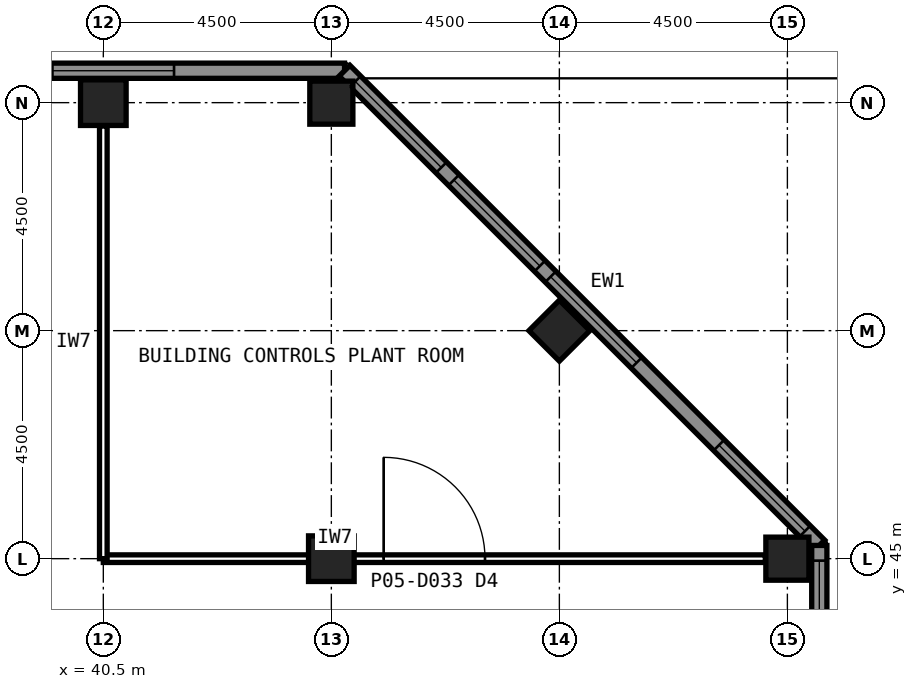
"""IFC4 building model, lengths in metres.
Left out: names, types, materials, properties, quantities, classifications, styles, units other than length and angle.
Written with IfcOpenShell. Run it as: python <this file> out.ifc"""

import sys

from ifc_helpers import new_model, si_unit, direction, frame, frame_2d, origin, origin_2d, place, context, subcontext, project, spatial, rectangle, hollow_rectangle, extrude, element, fill, save


model = new_model("IFC4")
c1 = context("Model", 3, precision=1e-05, world=origin(), true_north=direction((0.0, 1.0)))
c2 = subcontext(c1, "Body", "Model", "MODEL_VIEW")
j1 = project(units=[si_unit("LENGTHUNIT", "METRE"), si_unit("PLANEANGLEUNIT", "RADIAN")], contexts=[c1])
p1 = place(None, origin())
s1 = spatial("IfcSite", under=j1, at=p1, CompositionType="ELEMENT")
p2 = place(p1, origin())
s2 = spatial("IfcBuilding", under=s1, at=p2, CompositionType="ELEMENT")
p3 = place(p2, frame((0.0, 0.0, 23.0)))
s3 = spatial("IfcBuildingStorey", under=s2, at=p3, CompositionType="ELEMENT", Elevation=23.0)
for number, where, z_axis, x_axis in (
    (1, (54.0, 45.0, 0.0), (0.0, 0.0, 1.0), (1.0, 0.0, 0.0)),
    (2, (45.0, 54.0, 0.0), (0.0, 0.0, 1.0), (1.0, 0.0, 0.0)),
):
    element("IfcColumn", number, at=place(p3, frame(where, z_axis=z_axis, x_axis=x_axis)), inside=s3, PredefinedType="COLUMN", context=c2, shape_type="SweptSolid", body=[
        extrude(hollow_rectangle(XDim=0.85, YDim=0.85, WallThickness=0.05, at=origin_2d()), origin(), (0.0, 0.0, 1.0), 6.0),
    ])
p4 = place(p3, frame((40.5, 54.0, 0.0), z_axis=(0.0, 0.0, 1.0), x_axis=(1.0, 0.0, 0.0)))
e3 = element("IfcColumn", 3, at=p4, inside=s3, PredefinedType="COLUMN", context=c2, shape_type="SweptSolid", body=[
    extrude(hollow_rectangle(XDim=0.9, YDim=0.9, WallThickness=0.063, at=origin_2d()), origin(), (0.0, 0.0, 1.0), 6.0),
])
p5 = place(p3, frame((49.5, 49.5, 0.0), z_axis=(0.0, 0.0, 1.0), x_axis=(0.707106781187, 0.707106781187, 0.0)))
e4 = element("IfcColumn", 4, at=p5, inside=s3, PredefinedType="COLUMN", context=c2, shape_type="SweptSolid", body=[
    extrude(hollow_rectangle(XDim=0.85, YDim=0.85, WallThickness=0.05, at=origin_2d()), origin(), (0.0, 0.0, 1.0), 6.0),
])
p6 = place(p3, frame((45.0, 45.0, 0.0), z_axis=(0.0, 0.0, 1.0), x_axis=(1.0, 0.0, 0.0)))
e5 = element("IfcColumn", 5, at=p6, inside=s3, PredefinedType="COLUMN", context=c2, shape_type="SweptSolid", body=[
    extrude(hollow_rectangle(XDim=0.9, YDim=0.9, WallThickness=0.063, at=origin_2d()), origin(), (0.0, 0.0, 1.0), 6.0),
])
p7 = place(p3, frame((8.739, 54.63, 0.0), z_axis=(0.0, 0.0, 1.0), x_axis=(1.0, 0.0, 0.0)))
e6 = element("IfcWall", 6, at=p7, inside=s3, PredefinedType="SOLIDWALL", context=c2, shape_type="SweptSolid", body=[
    extrude(rectangle(XDim=36.522, YDim=0.3, at=frame_2d((18.261, 0.0))), origin(), (0.0, 0.0, 1.0), 6.0),
])
p8 = place(p7, frame((0.3, 0.0, 0.3)))
e7 = element("IfcOpeningElement", 7, at=p8, cuts=e6, PredefinedType="OPENING", context=c2, shape_type="SweptSolid", body=[
    extrude(rectangle(XDim=1.5, YDim=2.0, at=frame_2d((0.75, 1.0))), frame((0.0, 0.16, 0.0), z_axis=(0.0, -1.0, 0.0), x_axis=(1.0, 0.0, 0.0)), (0.0, 0.0, 1.0), 0.32),
])
p9 = place(p7, frame((3.365, 0.0, 1.2)))
e8 = element("IfcOpeningElement", 8, at=p9, cuts=e6, PredefinedType="OPENING", context=c2, shape_type="SweptSolid", body=[
    extrude(rectangle(XDim=2.4, YDim=3.0, at=frame_2d((1.2, 1.5))), frame((0.0, 0.16, 0.0), z_axis=(0.0, -1.0, 0.0), x_axis=(1.0, 0.0, 0.0)), (0.0, 0.0, 1.0), 0.32),
])
p10 = place(p7, frame((1.5, 0.0, 3.65)))
e9 = element("IfcOpeningElement", 9, at=p10, cuts=e6, PredefinedType="OPENING", context=c2, shape_type="SweptSolid", body=[
    extrude(rectangle(XDim=1.5, YDim=2.0, at=frame_2d((0.75, 1.0))), frame((0.0, 0.16, 0.0), z_axis=(0.0, -1.0, 0.0), x_axis=(1.0, 0.0, 0.0)), (0.0, 0.0, 1.0), 0.32),
])
p11 = place(p7, frame((6.1, 0.0, 3.6)))
e10 = element("IfcOpeningElement", 10, at=p11, cuts=e6, PredefinedType="OPENING", context=c2, shape_type="SweptSolid", body=[
    extrude(rectangle(XDim=1.5, YDim=2.0, at=frame_2d((0.75, 1.0))), frame((0.0, 0.16, 0.0), z_axis=(0.0, -1.0, 0.0), x_axis=(1.0, 0.0, 0.0)), (0.0, 0.0, 1.0), 0.32),
])
p12 = place(p7, frame((12.496, 0.0, 1.2)))
e11 = element("IfcOpeningElement", 11, at=p12, cuts=e6, PredefinedType="OPENING", context=c2, shape_type="SweptSolid", body=[
    extrude(rectangle(XDim=2.4, YDim=3.0, at=frame_2d((1.2, 1.5))), frame((0.0, 0.16, 0.0), z_axis=(0.0, -1.0, 0.0), x_axis=(1.0, 0.0, 0.0)), (0.0, 0.0, 1.0), 0.32),
])
p13 = place(p7, frame((7.45, 0.0, 0.3)))
e12 = element("IfcOpeningElement", 12, at=p13, cuts=e6, PredefinedType="OPENING", context=c2, shape_type="SweptSolid", body=[
    extrude(rectangle(XDim=2.4, YDim=3.0, at=frame_2d((1.2, 1.5))), frame((0.0, 0.16, 0.0), z_axis=(0.0, -1.0, 0.0), x_axis=(1.0, 0.0, 0.0)), (0.0, 0.0, 1.0), 0.32),
])
p14 = place(p7, frame((10.15, 0.0, 0.3)))
e13 = element("IfcOpeningElement", 13, at=p14, cuts=e6, PredefinedType="OPENING", context=c2, shape_type="SweptSolid", body=[
    extrude(rectangle(XDim=1.5, YDim=2.0, at=frame_2d((0.75, 1.0))), frame((0.0, 0.16, 0.0), z_axis=(0.0, -1.0, 0.0), x_axis=(1.0, 0.0, 0.0)), (0.0, 0.0, 1.0), 0.32),
])
p15 = place(p7, frame((21.626, 0.0, 1.2)))
e14 = element("IfcOpeningElement", 14, at=p15, cuts=e6, PredefinedType="OPENING", context=c2, shape_type="SweptSolid", body=[
    extrude(rectangle(XDim=2.4, YDim=3.0, at=frame_2d((1.2, 1.5))), frame((0.0, 0.16, 0.0), z_axis=(0.0, -1.0, 0.0), x_axis=(1.0, 0.0, 0.0)), (0.0, 0.0, 1.0), 0.32),
])
p16 = place(p7, frame((10.5, 0.0, 3.65)))
e15 = element("IfcOpeningElement", 15, at=p16, cuts=e6, PredefinedType="OPENING", context=c2, shape_type="SweptSolid", body=[
    extrude(rectangle(XDim=1.5, YDim=2.0, at=frame_2d((0.75, 1.0))), frame((0.0, 0.16, 0.0), z_axis=(0.0, -1.0, 0.0), x_axis=(1.0, 0.0, 0.0)), (0.0, 0.0, 1.0), 0.32),
])
p17 = place(p7, frame((16.45, 0.0, 0.3)))
e16 = element("IfcOpeningElement", 16, at=p17, cuts=e6, PredefinedType="OPENING", context=c2, shape_type="SweptSolid", body=[
    extrude(rectangle(XDim=2.4, YDim=3.0, at=frame_2d((1.2, 1.5))), frame((0.0, 0.16, 0.0), z_axis=(0.0, -1.0, 0.0), x_axis=(1.0, 0.0, 0.0)), (0.0, 0.0, 1.0), 0.32),
])
p18 = place(p7, frame((30.757, 0.0, 1.2)))
e17 = element("IfcOpeningElement", 17, at=p18, cuts=e6, PredefinedType="OPENING", context=c2, shape_type="SweptSolid", body=[
    extrude(rectangle(XDim=2.4, YDim=3.0, at=frame_2d((1.2, 1.5))), frame((0.0, 0.16, 0.0), z_axis=(0.0, -1.0, 0.0), x_axis=(1.0, 0.0, 0.0)), (0.0, 0.0, 1.0), 0.32),
])
p19 = place(p7, frame((25.45, 0.0, 0.3)))
e18 = element("IfcOpeningElement", 18, at=p19, cuts=e6, PredefinedType="OPENING", context=c2, shape_type="SweptSolid", body=[
    extrude(rectangle(XDim=2.4, YDim=3.0, at=frame_2d((1.2, 1.5))), frame((0.0, 0.16, 0.0), z_axis=(0.0, -1.0, 0.0), x_axis=(1.0, 0.0, 0.0)), (0.0, 0.0, 1.0), 0.32),
])
p20 = place(p3, frame((45.261, 54.63, 0.0), z_axis=(0.0, 0.0, 1.0), x_axis=(0.707106781187, -0.707106781187, 0.0)))
e19 = element("IfcWall", 19, at=p20, inside=s3, PredefinedType="SOLIDWALL", context=c2, shape_type="SweptSolid", body=[
    extrude(rectangle(XDim=13.25, YDim=0.3, at=frame_2d((6.625, 0.0))), origin(), (0.0, 0.0, 1.0), 6.0),
])
p21 = place(p20, frame((0.3, 0.0, 0.3)))
e20 = element("IfcOpeningElement", 20, at=p21, cuts=e19, PredefinedType="OPENING", context=c2, shape_type="SweptSolid", body=[
    extrude(rectangle(XDim=2.4, YDim=3.0, at=frame_2d((1.2, 1.5))), frame((0.0, 0.16, 0.0), z_axis=(0.0, -1.0, 0.0), x_axis=(1.0, 0.0, 0.0)), (0.0, 0.0, 1.0), 0.32),
])
p22 = place(p20, frame((3.05, 0.0, 2.7)))
e21 = element("IfcOpeningElement", 21, at=p22, cuts=e19, PredefinedType="OPENING", context=c2, shape_type="SweptSolid", body=[
    extrude(rectangle(XDim=2.4, YDim=3.0, at=frame_2d((1.2, 1.5))), frame((0.0, 0.16, 0.0), z_axis=(0.0, -1.0, 0.0), x_axis=(1.0, 0.0, 0.0)), (0.0, 0.0, 1.0), 0.32),
])
p23 = place(p20, frame((5.75, 0.0, 0.75)))
e22 = element("IfcOpeningElement", 22, at=p23, cuts=e19, PredefinedType="OPENING", context=c2, shape_type="SweptSolid", body=[
    extrude(rectangle(XDim=2.4, YDim=3.0, at=frame_2d((1.2, 1.5))), frame((0.0, 0.16, 0.0), z_axis=(0.0, -1.0, 0.0), x_axis=(1.0, 0.0, 0.0)), (0.0, 0.0, 1.0), 0.32),
])
p24 = place(p20, frame((10.45, 0.0, 0.3)))
e23 = element("IfcOpeningElement", 23, at=p24, cuts=e19, PredefinedType="OPENING", context=c2, shape_type="SweptSolid", body=[
    extrude(rectangle(XDim=2.4, YDim=3.0, at=frame_2d((1.2, 1.5))), frame((0.0, 0.16, 0.0), z_axis=(0.0, -1.0, 0.0), x_axis=(1.0, 0.0, 0.0)), (0.0, 0.0, 1.0), 0.32),
])
p25 = place(p3, frame((54.63, 45.261, 0.0), z_axis=(0.0, 0.0, 1.0), x_axis=(0.0, -1.0, 0.0)))
e24 = element("IfcWall", 24, at=p25, inside=s3, PredefinedType="SOLIDWALL", context=c2, shape_type="SweptSolid", body=[
    extrude(rectangle(XDim=36.522, YDim=0.3, at=frame_2d((18.261, 0.0))), origin(), (0.0, 0.0, 1.0), 6.0),
])
p26 = place(p25, frame((19.511, 0.0, 0.0)))
e25 = element("IfcOpeningElement", 25, at=p26, cuts=e24, PredefinedType="OPENING", context=c2, shape_type="SweptSolid", body=[
    extrude(rectangle(XDim=1.0, YDim=2.1, at=frame_2d((0.5, 1.05))), frame((0.0, 0.16, 0.0), z_axis=(0.0, -1.0, 0.0), x_axis=(1.0, 0.0, 0.0)), (0.0, 0.0, 1.0), 0.32),
])
p27 = place(p25, frame((0.3, 0.0, 0.3)))
e26 = element("IfcOpeningElement", 26, at=p27, cuts=e24, PredefinedType="OPENING", context=c2, shape_type="SweptSolid", body=[
    extrude(rectangle(XDim=1.5, YDim=2.0, at=frame_2d((0.75, 1.0))), frame((0.0, 0.16, 0.0), z_axis=(0.0, -1.0, 0.0), x_axis=(1.0, 0.0, 0.0)), (0.0, 0.0, 1.0), 0.32),
])
p28 = place(p25, frame((3.365, 0.0, 1.2)))
e27 = element("IfcOpeningElement", 27, at=p28, cuts=e24, PredefinedType="OPENING", context=c2, shape_type="SweptSolid", body=[
    extrude(rectangle(XDim=2.4, YDim=3.0, at=frame_2d((1.2, 1.5))), frame((0.0, 0.16, 0.0), z_axis=(0.0, -1.0, 0.0), x_axis=(1.0, 0.0, 0.0)), (0.0, 0.0, 1.0), 0.32),
])
p29 = place(p25, frame((1.5, 0.0, 3.65)))
e28 = element("IfcOpeningElement", 28, at=p29, cuts=e24, PredefinedType="OPENING", context=c2, shape_type="SweptSolid", body=[
    extrude(rectangle(XDim=1.5, YDim=2.0, at=frame_2d((0.75, 1.0))), frame((0.0, 0.16, 0.0), z_axis=(0.0, -1.0, 0.0), x_axis=(1.0, 0.0, 0.0)), (0.0, 0.0, 1.0), 0.32),
])
p30 = place(p25, frame((6.1, 0.0, 3.6)))
e29 = element("IfcOpeningElement", 29, at=p30, cuts=e24, PredefinedType="OPENING", context=c2, shape_type="SweptSolid", body=[
    extrude(rectangle(XDim=1.5, YDim=2.0, at=frame_2d((0.75, 1.0))), frame((0.0, 0.16, 0.0), z_axis=(0.0, -1.0, 0.0), x_axis=(1.0, 0.0, 0.0)), (0.0, 0.0, 1.0), 0.32),
])
p31 = place(p25, frame((12.496, 0.0, 1.2)))
e30 = element("IfcOpeningElement", 30, at=p31, cuts=e24, PredefinedType="OPENING", context=c2, shape_type="SweptSolid", body=[
    extrude(rectangle(XDim=2.4, YDim=3.0, at=frame_2d((1.2, 1.5))), frame((0.0, 0.16, 0.0), z_axis=(0.0, -1.0, 0.0), x_axis=(1.0, 0.0, 0.0)), (0.0, 0.0, 1.0), 0.32),
])
p32 = place(p25, frame((7.45, 0.0, 0.3)))
e31 = element("IfcOpeningElement", 31, at=p32, cuts=e24, PredefinedType="OPENING", context=c2, shape_type="SweptSolid", body=[
    extrude(rectangle(XDim=2.4, YDim=3.0, at=frame_2d((1.2, 1.5))), frame((0.0, 0.16, 0.0), z_axis=(0.0, -1.0, 0.0), x_axis=(1.0, 0.0, 0.0)), (0.0, 0.0, 1.0), 0.32),
])
p33 = place(p25, frame((21.626, 0.0, 1.2)))
e32 = element("IfcOpeningElement", 32, at=p33, cuts=e24, PredefinedType="OPENING", context=c2, shape_type="SweptSolid", body=[
    extrude(rectangle(XDim=2.4, YDim=3.0, at=frame_2d((1.2, 1.5))), frame((0.0, 0.16, 0.0), z_axis=(0.0, -1.0, 0.0), x_axis=(1.0, 0.0, 0.0)), (0.0, 0.0, 1.0), 0.32),
])
p34 = place(p25, frame((10.15, 0.0, 0.3)))
e33 = element("IfcOpeningElement", 33, at=p34, cuts=e24, PredefinedType="OPENING", context=c2, shape_type="SweptSolid", body=[
    extrude(rectangle(XDim=1.5, YDim=2.0, at=frame_2d((0.75, 1.0))), frame((0.0, 0.16, 0.0), z_axis=(0.0, -1.0, 0.0), x_axis=(1.0, 0.0, 0.0)), (0.0, 0.0, 1.0), 0.32),
])
p35 = place(p25, frame((16.45, 0.0, 0.3)))
e34 = element("IfcOpeningElement", 34, at=p35, cuts=e24, PredefinedType="OPENING", context=c2, shape_type="SweptSolid", body=[
    extrude(rectangle(XDim=2.4, YDim=3.0, at=frame_2d((1.2, 1.5))), frame((0.0, 0.16, 0.0), z_axis=(0.0, -1.0, 0.0), x_axis=(1.0, 0.0, 0.0)), (0.0, 0.0, 1.0), 0.32),
])
p36 = place(p25, frame((30.757, 0.0, 1.2)))
e35 = element("IfcOpeningElement", 35, at=p36, cuts=e24, PredefinedType="OPENING", context=c2, shape_type="SweptSolid", body=[
    extrude(rectangle(XDim=2.4, YDim=3.0, at=frame_2d((1.2, 1.5))), frame((0.0, 0.16, 0.0), z_axis=(0.0, -1.0, 0.0), x_axis=(1.0, 0.0, 0.0)), (0.0, 0.0, 1.0), 0.32),
])
p37 = place(p25, frame((25.45, 0.0, 0.3)))
e36 = element("IfcOpeningElement", 36, at=p37, cuts=e24, PredefinedType="OPENING", context=c2, shape_type="SweptSolid", body=[
    extrude(rectangle(XDim=2.4, YDim=3.0, at=frame_2d((1.2, 1.5))), frame((0.0, 0.16, 0.0), z_axis=(0.0, -1.0, 0.0), x_axis=(1.0, 0.0, 0.0)), (0.0, 0.0, 1.0), 0.32),
])
p38 = place(p3, frame((40.5, 45.0, 0.0), z_axis=(0.0, 0.0, 1.0), x_axis=(1.0, 0.0, 0.0)))
e37 = element("IfcWall", 37, at=p38, inside=s3, PredefinedType="PARTITIONING", context=c2, shape_type="SweptSolid", body=[
    extrude(rectangle(XDim=13.065, YDim=0.15, at=frame_2d((6.532, 0.0))), origin(), (0.0, 0.0, 1.0), 5.229),
])
p39 = place(p38, frame((5.532, 0.0, 0.0)))
e38 = element("IfcOpeningElement", 38, at=p39, cuts=e37, PredefinedType="OPENING", context=c2, shape_type="SweptSolid", body=[
    extrude(rectangle(XDim=2.0, YDim=2.4, at=frame_2d((1.0, 1.2))), frame((0.0, 0.085, 0.0), z_axis=(0.0, -1.0, 0.0), x_axis=(1.0, 0.0, 0.0)), (0.0, 0.0, 1.0), 0.17),
])
p40 = place(p3, frame((40.5, 53.54, 0.0), z_axis=(0.0, 0.0, 1.0), x_axis=(0.0, -1.0, 0.0)))
e39 = element("IfcWall", 39, at=p40, inside=s3, PredefinedType="PARTITIONING", context=c2, shape_type="SweptSolid", body=[
    extrude(rectangle(XDim=8.54, YDim=0.15, at=frame_2d((4.27, 0.0))), origin(), (0.0, 0.0, 1.0), 4.989),
])
p41 = place(p18, origin())
e40 = element("IfcWindow", 40, at=p41, inside=s3, PartitioningType="SINGLE_PANEL", PredefinedType="USERDEFINED", context=c2, shape_type="SweptSolid", body=[
    extrude(rectangle(XDim=2.4, YDim=3.0, at=frame_2d((1.2, 1.5))), frame((0.0, 0.03, 0.0), z_axis=(0.0, -1.0, 0.0), x_axis=(1.0, 0.0, 0.0)), (0.0, 0.0, 1.0), 0.06),
])
fill(e17, e40)
p42 = place(p21, origin())
e41 = element("IfcWindow", 41, at=p42, inside=s3, PartitioningType="SINGLE_PANEL", PredefinedType="USERDEFINED", context=c2, shape_type="SweptSolid", body=[
    extrude(rectangle(XDim=2.4, YDim=3.0, at=frame_2d((1.2, 1.5))), frame((0.0, 0.03, 0.0), z_axis=(0.0, -1.0, 0.0), x_axis=(1.0, 0.0, 0.0)), (0.0, 0.0, 1.0), 0.06),
])
fill(e20, e41)
p43 = place(p22, origin())
e42 = element("IfcWindow", 42, at=p43, inside=s3, PartitioningType="SINGLE_PANEL", PredefinedType="USERDEFINED", context=c2, shape_type="SweptSolid", body=[
    extrude(rectangle(XDim=2.4, YDim=3.0, at=frame_2d((1.2, 1.5))), frame((0.0, 0.03, 0.0), z_axis=(0.0, -1.0, 0.0), x_axis=(1.0, 0.0, 0.0)), (0.0, 0.0, 1.0), 0.06),
])
fill(e21, e42)
p44 = place(p23, origin())
e43 = element("IfcWindow", 43, at=p44, inside=s3, PartitioningType="SINGLE_PANEL", PredefinedType="USERDEFINED", context=c2, shape_type="SweptSolid", body=[
    extrude(rectangle(XDim=2.4, YDim=3.0, at=frame_2d((1.2, 1.5))), frame((0.0, 0.03, 0.0), z_axis=(0.0, -1.0, 0.0), x_axis=(1.0, 0.0, 0.0)), (0.0, 0.0, 1.0), 0.06),
])
fill(e22, e43)
p45 = place(p24, origin())
e44 = element("IfcWindow", 44, at=p45, inside=s3, PartitioningType="SINGLE_PANEL", PredefinedType="USERDEFINED", context=c2, shape_type="SweptSolid", body=[
    extrude(rectangle(XDim=2.4, YDim=3.0, at=frame_2d((1.2, 1.5))), frame((0.0, 0.03, 0.0), z_axis=(0.0, -1.0, 0.0), x_axis=(1.0, 0.0, 0.0)), (0.0, 0.0, 1.0), 0.06),
])
fill(e23, e44)
p46 = place(p27, origin())
e45 = element("IfcWindow", 45, at=p46, inside=s3, PartitioningType="SINGLE_PANEL", PredefinedType="USERDEFINED", context=c2, shape_type="SweptSolid", body=[
    extrude(rectangle(XDim=1.5, YDim=2.0, at=frame_2d((0.75, 1.0))), frame((0.0, 0.03, 0.0), z_axis=(0.0, -1.0, 0.0), x_axis=(1.0, 0.0, 0.0)), (0.0, 0.0, 1.0), 0.06),
])
fill(e26, e45)
p47 = place(p39, origin())
e46 = element("IfcDoor", 46, at=p47, inside=s3, OperationType="SINGLE_SWING_LEFT", PredefinedType="DOOR", context=c2, shape_type="SweptSolid", body=[
    extrude(rectangle(XDim=2.0, YDim=2.4, at=frame_2d((1.0, 1.2))), frame((0.0, 0.025, 0.0), z_axis=(0.0, -1.0, 0.0), x_axis=(1.0, 0.0, 0.0)), (0.0, 0.0, 1.0), 0.05),
])
fill(e38, e46)
save(model, sys.argv[1])
